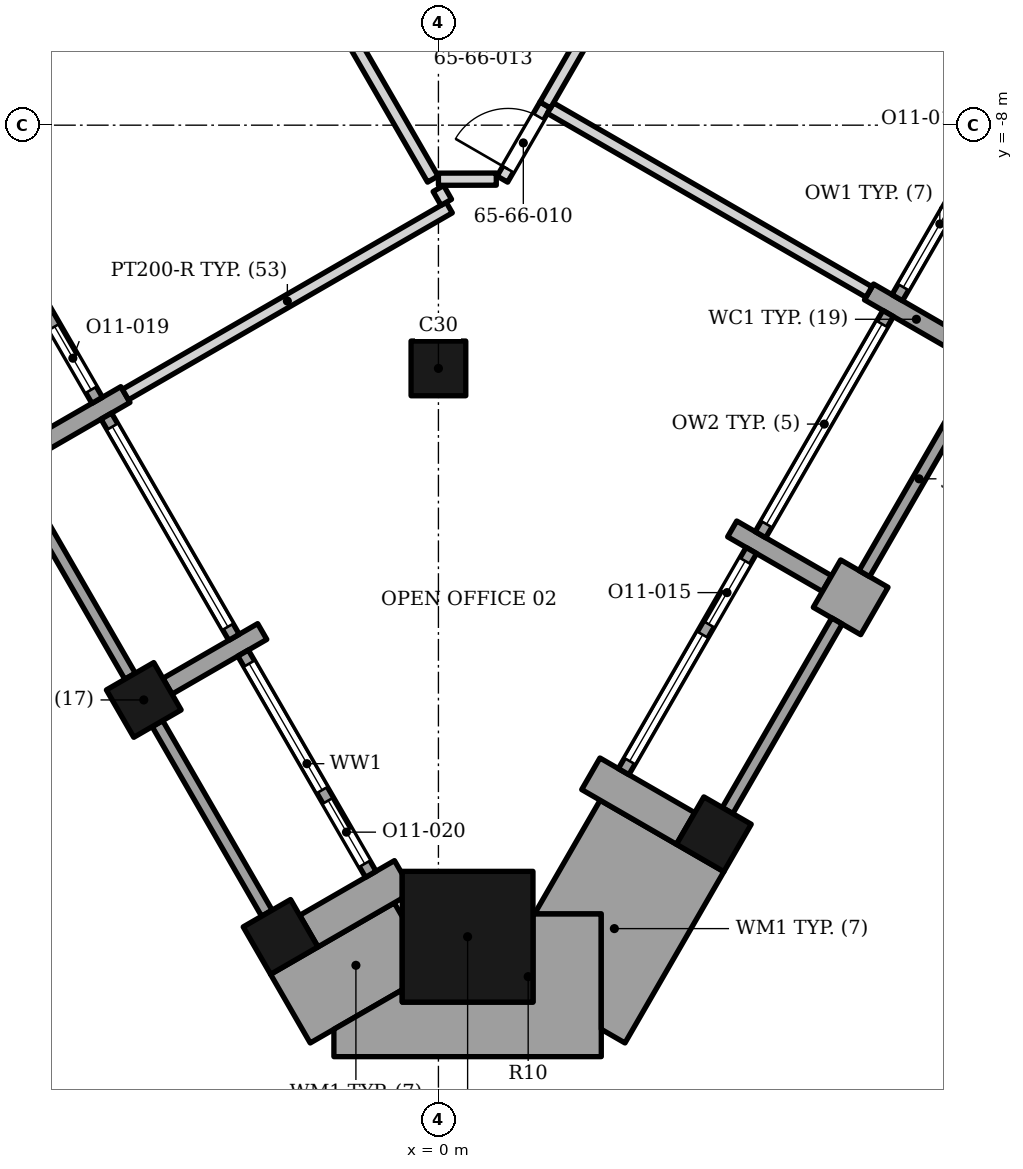
"""IFC4 building model, lengths in metres.
Left out: names, types, materials, properties, quantities, classifications, styles, units other than length and angle.
Written with IfcOpenShell. Run it as: python <this file> out.ifc"""

import sys

from ifc_helpers import new_model, si_unit, direction, frame, frame_2d, origin, origin_2d, place, context, subcontext, project, spatial, polyline, rectangle, outline, extrude, element, fill, save


model = new_model("IFC4")
c1 = context("Model", 3, precision=1e-05, world=origin(), true_north=direction((0.0, 1.0)))
c2 = subcontext(c1, "Body", "Model", "MODEL_VIEW")
j1 = project(units=[si_unit("LENGTHUNIT", "METRE"), si_unit("PLANEANGLEUNIT", "RADIAN")], contexts=[c1])
p1 = place(None, origin())
s1 = spatial("IfcSite", under=j1, at=p1, CompositionType="ELEMENT")
p2 = place(p1, origin())
s2 = spatial("IfcBuilding", under=s1, at=p2, CompositionType="ELEMENT")
p3 = place(p2, frame((0.0, 0.0, 271.6)))
s3 = spatial("IfcBuildingStorey", under=s2, at=p3, CompositionType="ELEMENT", Elevation=271.6)
p4 = place(p3, frame((0.48, -21.346, 0.0), z_axis=(0.0, 0.0, 1.0), x_axis=(0.0, 1.0, 0.0)))
e1 = element("IfcColumn", 1, at=p4, inside=s3, PredefinedType="COLUMN", context=c2, shape_type="SweptSolid", body=[
    extrude(rectangle(XDim=2.15, YDim=2.15, at=origin_2d()), origin(), (0.0, 0.0, 1.0), 3.9),
])
for number, where, z_axis, x_axis in (
    (2, (0.0, -12.0, 0.0), (0.0, 0.0, 1.0), (1.0, 0.0, 0.0)),
    (3, (-4.846, -17.452, 0.0), (0.0, 0.0, 1.0), (0.5, -0.866, 0.0)),
    (4, (-2.596, -21.349, 0.0), (0.0, 0.0, 1.0), (0.5, -0.866, 0.0)),
    (5, (4.53, -19.661, 0.0), (0.0, 0.0, 1.0), (0.5, 0.866, 0.0)),
):
    element("IfcColumn", number, at=place(p3, frame(where, z_axis=z_axis, x_axis=x_axis)), inside=s3, PredefinedType="COLUMN", context=c2, shape_type="SweptSolid", body=[
        extrude(rectangle(XDim=0.9, YDim=0.9, at=origin_2d()), origin(), (0.0, 0.0, 1.0), 3.9),
    ])
p5 = place(p3, frame((-6.707, -13.33, 0.0), z_axis=(0.0, 0.0, 1.0), x_axis=(0.866047807691, 0.499961193289, 0.0)))
e6 = element("IfcWall", 6, at=p5, inside=s3, PredefinedType="SOLIDWALL", context=c2, shape_type="SweptSolid", body=[
    extrude(rectangle(XDim=1.8, YDim=0.3, at=frame_2d((0.9, 0.0))), origin(), (0.0, 0.0, 1.0), 3.0),
])
p6 = place(p3, frame((-4.456, -17.227, 0.0), z_axis=(0.0, 0.0, 1.0), x_axis=(0.866013897511, 0.50001992892, 0.0)))
e7 = element("IfcWall", 7, at=p6, inside=s3, PredefinedType="SOLIDWALL", context=c2, shape_type="SweptSolid", body=[
    extrude(rectangle(XDim=1.8, YDim=0.3, at=frame_2d((0.9, 0.0))), origin(), (0.0, 0.0, 1.0), 3.0),
])
p7 = place(p3, origin())
e8 = element("IfcWall", 8, at=p7, inside=s3, PredefinedType="SOLIDWALL", context=c2, shape_type="SweptSolid", body=[
    extrude(outline(polyline([(-1.981, -21.514), (-0.595, -20.713), (-0.595, -20.315), (-0.723, -20.094), (-2.281, -20.994), (-1.981, -21.514)])), origin(), (0.0, 0.0, 1.0), 3.0),
])
p8 = place(p3, frame((-7.712, -8.888, 0.0), z_axis=(0.0, 0.0, 1.0), x_axis=(0.500027713859, -0.866009402589, 0.0)))
e9 = element("IfcWall", 9, at=p8, inside=s3, PredefinedType="ELEMENTEDWALL", context=c2, shape_type="SweptSolid", body=[
    extrude(rectangle(XDim=4.2, YDim=0.2, at=frame_2d((2.1, 0.0))), origin(), (0.0, 0.0, 1.0), 2.95),
])
p9 = place(p8, frame((0.2, 0.0, 0.45)))
e10 = element("IfcOpeningElement", 10, at=p9, cuts=e9, PredefinedType="OPENING", context=c2, shape_type="SweptSolid", body=[
    extrude(rectangle(XDim=2.4, YDim=2.25, at=frame_2d((1.2, 1.125))), frame((0.0, 0.11, 0.0), z_axis=(0.0, -1.0, 0.0), x_axis=(1.0, 0.0, 0.0)), (0.0, 0.0, 1.0), 0.22),
])
p10 = place(p8, frame((2.8, 0.0, 0.0)))
e11 = element("IfcOpeningElement", 11, at=p10, cuts=e9, PredefinedType="OPENING", context=c2, shape_type="SweptSolid", body=[
    extrude(rectangle(XDim=1.2, YDim=2.7, at=frame_2d((0.6, 1.35))), frame((0.0, 0.11, 0.0), z_axis=(0.0, -1.0, 0.0), x_axis=(1.0, 0.0, 0.0)), (0.0, 0.0, 1.0), 0.22),
])
p11 = place(p3, frame((-6.871, -13.945, 0.0), z_axis=(0.0, 0.0, 1.0), x_axis=(0.500012057535, -0.866018442252, 0.0)))
e12 = element("IfcWall", 12, at=p11, inside=s3, PredefinedType="SOLIDWALL", context=c2, shape_type="SweptSolid", body=[
    extrude(rectangle(XDim=3.6, YDim=0.2, at=frame_2d((1.8, 0.0))), origin(), (0.0, 0.0, 1.0), 3.0),
])
p12 = place(p3, frame((-5.462, -12.785, 0.0), z_axis=(0.0, 0.0, 1.0), x_axis=(0.500002543286, -0.866023935413, 0.0)))
e13 = element("IfcWall", 13, at=p12, inside=s3, PredefinedType="ELEMENTEDWALL", context=c2, shape_type="SweptSolid", body=[
    extrude(rectangle(XDim=4.2, YDim=0.2, at=frame_2d((2.1, 0.0))), origin(), (0.0, 0.0, 1.0), 3.0),
])
p13 = place(p12, frame((0.2, 0.0, 0.45)))
e14 = element("IfcOpeningElement", 14, at=p13, cuts=e13, PredefinedType="OPENING", context=c2, shape_type="SweptSolid", body=[
    extrude(rectangle(XDim=3.8, YDim=2.25, at=frame_2d((1.9, 1.125))), frame((0.0, 0.11, 0.0), z_axis=(0.0, -1.0, 0.0), x_axis=(1.0, 0.0, 0.0)), (0.0, 0.0, 1.0), 0.22),
])
p14 = place(p3, frame((-4.621, -17.842, 0.0), z_axis=(0.0, 0.0, 1.0), x_axis=(0.500012057535, -0.866018442252, 0.0)))
e15 = element("IfcWall", 15, at=p14, inside=s3, PredefinedType="SOLIDWALL", context=c2, shape_type="SweptSolid", body=[
    extrude(rectangle(XDim=3.6, YDim=0.2, at=frame_2d((1.8, 0.0))), origin(), (0.0, 0.0, 1.0), 3.0),
])
p15 = place(p3, frame((-3.212, -16.682, 0.0), z_axis=(0.0, 0.0, 1.0), x_axis=(0.500027713859, -0.866009402589, 0.0)))
e16 = element("IfcWall", 16, at=p15, inside=s3, PredefinedType="ELEMENTEDWALL", context=c2, shape_type="SweptSolid", body=[
    extrude(rectangle(XDim=4.2, YDim=0.2, at=frame_2d((2.1, 0.0))), origin(), (0.0, 0.0, 1.0), 3.0),
])
p16 = place(p15, frame((0.2, 0.0, 0.45)))
e17 = element("IfcOpeningElement", 17, at=p16, cuts=e16, PredefinedType="OPENING", context=c2, shape_type="SweptSolid", body=[
    extrude(rectangle(XDim=2.4, YDim=2.25, at=frame_2d((1.2, 1.125))), frame((0.0, 0.11, 0.0), z_axis=(0.0, -1.0, 0.0), x_axis=(1.0, 0.0, 0.0)), (0.0, 0.0, 1.0), 0.22),
])
p17 = place(p15, frame((2.8, 0.0, 0.0)))
e18 = element("IfcOpeningElement", 18, at=p17, cuts=e16, PredefinedType="OPENING", context=c2, shape_type="SweptSolid", body=[
    extrude(rectangle(XDim=1.2, YDim=2.7, at=frame_2d((0.6, 1.35))), frame((0.0, 0.11, 0.0), z_axis=(0.0, -1.0, 0.0), x_axis=(1.0, 0.0, 0.0)), (0.0, 0.0, 1.0), 0.22),
])
p18 = place(p3, frame((4.065, -19.566, 0.0), z_axis=(0.0, 0.0, 1.0), x_axis=(-0.865989075817, 0.500062916607, 0.0)))
e19 = element("IfcWall", 19, at=p18, inside=s3, PredefinedType="SOLIDWALL", context=c2, shape_type="SweptSolid", body=[
    extrude(rectangle(XDim=1.8, YDim=0.6, at=frame_2d((0.9, 0.0))), origin(), (0.0, 0.0, 1.0), 3.0),
])
p19 = place(p3, frame((7.005, -15.375, 0.0), z_axis=(0.0, 0.0, 1.0), x_axis=(-0.499902469156, -0.866081705922, 0.0)))
e20 = element("IfcWall", 20, at=p19, inside=s3, PredefinedType="SOLIDWALL", context=c2, shape_type="SweptSolid", body=[
    extrude(rectangle(XDim=0.9, YDim=0.9, at=frame_2d((0.45, 0.0))), origin(), (0.0, 0.0, 1.0), 3.0),
])
for number, where, z_axis, x_axis in (
    (21, (6.39, -15.539, 0.0), (0.0, 0.0, 1.0), (-0.866, 0.5, 0.0)),
    (22, (8.64, -11.642, 0.0), (0.0, 0.0, 1.0), (-0.866, 0.5, 0.0)),
):
    element("IfcWall", number, at=place(p3, frame(where, z_axis=z_axis, x_axis=x_axis)), inside=s3, PredefinedType="SOLIDWALL", context=c2, shape_type="SweptSolid", body=[
        extrude(rectangle(XDim=1.8, YDim=0.3, at=frame_2d((0.9, 0.0))), origin(), (0.0, 0.0, 1.0), 3.0),
    ])
p20 = place(p3, frame((4.755, -19.272, 0.0), z_axis=(0.0, 0.0, 1.0), x_axis=(0.500012057535, 0.866018442252, 0.0)))
e23 = element("IfcWall", 23, at=p20, inside=s3, PredefinedType="SOLIDWALL", context=c2, shape_type="SweptSolid", body=[
    extrude(rectangle(XDim=3.6, YDim=0.2, at=frame_2d((1.8, 0.0))), origin(), (0.0, 0.0, 1.0), 3.0),
])
p21 = place(p3, frame((3.046, -18.632, 0.0), z_axis=(0.0, 0.0, 1.0), x_axis=(0.499958946799, 0.866049104564, 0.0)))
e24 = element("IfcWall", 24, at=p21, inside=s3, PredefinedType="ELEMENTEDWALL", context=c2, shape_type="SweptSolid", body=[
    extrude(rectangle(XDim=4.2, YDim=0.2, at=frame_2d((2.1, 0.0))), origin(), (0.0, 0.0, 1.0), 3.0),
])
p22 = place(p21, frame((0.2, 0.0, 0.45)))
e25 = element("IfcOpeningElement", 25, at=p22, cuts=e24, PredefinedType="OPENING", context=c2, shape_type="SweptSolid", body=[
    extrude(rectangle(XDim=2.4, YDim=2.25, at=frame_2d((1.2, 1.125))), frame((0.0, 0.11, 0.0), z_axis=(0.0, -1.0, 0.0), x_axis=(1.0, 0.0, 0.0)), (0.0, 0.0, 1.0), 0.22),
])
p23 = place(p21, frame((2.8, 0.0, 0.0)))
e26 = element("IfcOpeningElement", 26, at=p23, cuts=e24, PredefinedType="OPENING", context=c2, shape_type="SweptSolid", body=[
    extrude(rectangle(XDim=1.2, YDim=2.7, at=frame_2d((0.6, 1.35))), frame((0.0, 0.11, 0.0), z_axis=(0.0, -1.0, 0.0), x_axis=(1.0, 0.0, 0.0)), (0.0, 0.0, 1.0), 0.22),
])
p24 = place(p3, frame((7.005, -15.375, 0.0), z_axis=(0.0, 0.0, 1.0), x_axis=(0.500012057535, 0.866018442252, 0.0)))
e27 = element("IfcWall", 27, at=p24, inside=s3, PredefinedType="SOLIDWALL", context=c2, shape_type="SweptSolid", body=[
    extrude(rectangle(XDim=3.6, YDim=0.2, at=frame_2d((1.8, 0.0))), origin(), (0.0, 0.0, 1.0), 3.0),
])
p25 = place(p3, frame((5.296, -14.734, 0.0), z_axis=(0.0, 0.0, 1.0), x_axis=(0.49998411664, 0.866034573852, 0.0)))
e28 = element("IfcWall", 28, at=p25, inside=s3, PredefinedType="ELEMENTEDWALL", context=c2, shape_type="SweptSolid", body=[
    extrude(rectangle(XDim=4.2, YDim=0.2, at=frame_2d((2.1, 0.0))), origin(), (0.0, 0.0, 1.0), 2.95),
])
p26 = place(p25, frame((0.2, 0.0, 0.45)))
e29 = element("IfcOpeningElement", 29, at=p26, cuts=e28, PredefinedType="OPENING", context=c2, shape_type="SweptSolid", body=[
    extrude(rectangle(XDim=3.8, YDim=2.25, at=frame_2d((1.9, 1.125))), frame((0.0, 0.11, 0.0), z_axis=(0.0, -1.0, 0.0), x_axis=(1.0, 0.0, 0.0)), (0.0, 0.0, 1.0), 0.22),
])
p27 = place(p3, frame((7.546, -10.837, 0.0), z_axis=(0.0, 0.0, 1.0), x_axis=(0.49998411664, 0.866034573852, 0.0)))
e30 = element("IfcWall", 30, at=p27, inside=s3, PredefinedType="ELEMENTEDWALL", context=c2, shape_type="SweptSolid", body=[
    extrude(rectangle(XDim=4.2, YDim=0.2, at=frame_2d((2.1, 0.0))), origin(), (0.0, 0.0, 1.0), 3.0),
])
p28 = place(p27, frame((0.2, 0.0, 0.45)))
e31 = element("IfcOpeningElement", 31, at=p28, cuts=e30, PredefinedType="OPENING", context=c2, shape_type="SweptSolid", body=[
    extrude(rectangle(XDim=2.4, YDim=2.25, at=frame_2d((1.2, 1.125))), frame((0.0, 0.11, 0.0), z_axis=(0.0, -1.0, 0.0), x_axis=(1.0, 0.0, 0.0)), (0.0, 0.0, 1.0), 0.22),
])
p29 = place(p27, frame((2.8, 0.0, 0.0)))
e32 = element("IfcOpeningElement", 32, at=p29, cuts=e30, PredefinedType="OPENING", context=c2, shape_type="SweptSolid", body=[
    extrude(rectangle(XDim=1.2, YDim=2.7, at=frame_2d((0.6, 1.35))), frame((0.0, 0.11, 0.0), z_axis=(0.0, -1.0, 0.0), x_axis=(1.0, 0.0, 0.0)), (0.0, 0.0, 1.0), 0.22),
])
p30 = place(p3, origin())
e33 = element("IfcWall", 33, at=p30, inside=s3, PredefinedType="SOLIDWALL", context=c2, shape_type="SweptSolid", body=[
    extrude(outline(polyline([(-0.595, -21.015), (-0.726, -20.789), (-2.761, -21.964), (-2.109, -23.093), (-0.595, -22.219), (-0.595, -21.015)])), origin(), (0.0, 0.0, 1.0), 3.0),
])
p31 = place(p3, origin())
e34 = element("IfcWall", 34, at=p31, inside=s3, PredefinedType="SOLIDWALL", context=c2, shape_type="SweptSolid", body=[
    extrude(outline(polyline([(-0.595, -22.421), (-0.595, -22.219), (-1.719, -22.868), (-1.719, -23.318), (2.678, -23.318), (2.678, -20.968), (1.555, -20.968), (1.555, -22.421), (-0.595, -22.421)])), origin(), (0.0, 0.0, 1.0), 3.0),
])
p32 = place(p3, origin())
e35 = element("IfcWall", 35, at=p32, inside=s3, PredefinedType="SOLIDWALL", context=c2, shape_type="SweptSolid", body=[
    extrude(outline(polyline([(2.678, -20.968), (2.678, -22.868), (3.068, -23.093), (4.695, -20.276), (2.659, -19.101), (1.582, -20.968), (2.678, -20.968)])), origin(), (0.0, 0.0, 1.0), 3.0),
])
p33 = place(p3, frame((-5.147, -12.43, 0.0), z_axis=(0.0, 0.0, 1.0), x_axis=(0.866013692856, 0.500020283374, 0.0)))
e36 = element("IfcWall", 36, at=p33, inside=s3, PredefinedType="PARTITIONING", context=c2, shape_type="SweptSolid", body=[
    extrude(rectangle(XDim=6.15, YDim=0.2, at=frame_2d((3.075, 0.0))), origin(), (0.0, 0.0, 1.0), 2.884),
])
p34 = place(p3, frame((0.0, -9.042, 0.0), z_axis=(0.0, 0.0, 1.0), x_axis=(0.494524249255, -0.869163832024, 0.0)))
e37 = element("IfcWall", 37, at=p34, inside=s3, PredefinedType="PARTITIONING", context=c2, shape_type="SweptSolid", body=[
    extrude(rectangle(XDim=0.261, YDim=0.2, at=frame_2d((0.13, 0.0))), origin(), (0.0, 0.0, 1.0), 2.884),
])
p35 = place(p3, frame((-4.323, -1.562, 0.0), z_axis=(0.0, 0.0, 1.0), x_axis=(0.500177101832, -0.865923129846, 0.0)))
e38 = element("IfcWall", 38, at=p35, inside=s3, PredefinedType="PARTITIONING", context=c2, shape_type="SweptSolid", body=[
    extrude(rectangle(XDim=8.459, YDim=0.2, at=frame_2d((4.23, 0.0))), origin(), (0.0, 0.0, 1.0), 2.884),
])
p36 = place(p35, frame((3.729, 0.0, 0.0)))
e39 = element("IfcOpeningElement", 39, at=p36, cuts=e38, PredefinedType="OPENING", context=c2, shape_type="SweptSolid", body=[
    extrude(rectangle(XDim=1.0, YDim=2.1, at=frame_2d((0.5, 1.05))), frame((0.0, 0.11, 0.0), z_axis=(0.0, -1.0, 0.0), x_axis=(1.0, 0.0, 0.0)), (0.0, 0.0, 1.0), 0.22),
])
p37 = place(p3, frame((0.0, -8.889, 0.0), z_axis=(0.0, 0.0, 1.0), x_axis=(0.999998814747, 0.001539644057, 0.0)))
e40 = element("IfcWall", 40, at=p37, inside=s3, PredefinedType="PARTITIONING", context=c2, shape_type="SweptSolid", body=[
    extrude(rectangle(XDim=0.951, YDim=0.2, at=frame_2d((0.476, 0.0))), origin(), (0.0, 0.0, 1.0), 3.73),
])
p38 = place(p3, frame((1.052, -8.887, 0.0), z_axis=(0.0, 0.0, 1.0), x_axis=(0.500967914192, 0.865465856606, 0.0)))
e41 = element("IfcWall", 41, at=p38, inside=s3, PredefinedType="PARTITIONING", context=c2, shape_type="SweptSolid", body=[
    extrude(rectangle(XDim=1.408, YDim=0.2, at=frame_2d((0.704, 0.0))), origin(), (0.0, 0.0, 1.0), 3.73),
])
p39 = place(p38, frame((0.188, 0.0, 0.0)))
e42 = element("IfcOpeningElement", 42, at=p39, cuts=e41, PredefinedType="OPENING", context=c2, shape_type="SweptSolid", body=[
    extrude(rectangle(XDim=1.0, YDim=2.1, at=frame_2d((0.5, 1.05))), frame((0.0, 0.11, 0.0), z_axis=(0.0, -1.0, 0.0), x_axis=(1.0, 0.0, 0.0)), (0.0, 0.0, 1.0), 0.22),
])
p40 = place(p3, frame((1.841, -7.719, 0.0), z_axis=(0.0, 0.0, 1.0), x_axis=(0.866131832054, -0.499815615506, 0.0)))
e43 = element("IfcWall", 43, at=p40, inside=s3, PredefinedType="PARTITIONING", context=c2, shape_type="SweptSolid", body=[
    extrude(rectangle(XDim=6.05, YDim=0.2, at=frame_2d((3.025, 0.0))), origin(), (0.0, 0.0, 1.0), 2.884),
])
p41 = place(p3, frame((1.757, -7.668, 0.0), z_axis=(0.0, 0.0, 1.0), x_axis=(0.500002084865, 0.866024200084, 0.0)))
e44 = element("IfcWall", 44, at=p41, inside=s3, PredefinedType="PARTITIONING", context=c2, shape_type="SweptSolid", body=[
    extrude(rectangle(XDim=12.949, YDim=0.2, at=frame_2d((6.474, 0.0))), origin(), (0.0, 0.0, 1.0), 2.884),
])
p42 = place(p41, frame((4.0, 0.0, 0.0)))
e45 = element("IfcOpeningElement", 45, at=p42, cuts=e44, PredefinedType="OPENING", context=c2, shape_type="SweptSolid", body=[
    extrude(rectangle(XDim=1.0, YDim=2.4, at=frame_2d((0.5, 1.2))), frame((0.0, 0.11, 0.0), z_axis=(0.0, -1.0, 0.0), x_axis=(1.0, 0.0, 0.0)), (0.0, 0.0, 1.0), 0.22),
])
p43 = place(p10, origin())
e46 = element("IfcDoor", 46, at=p43, inside=s3, OperationType="SINGLE_SWING_LEFT", PredefinedType="DOOR", context=c2, shape_type="SweptSolid", body=[
    extrude(rectangle(XDim=1.2, YDim=2.7, at=frame_2d((0.6, 1.35))), frame((0.0, 0.025, 0.0), z_axis=(0.0, -1.0, 0.0), x_axis=(1.0, 0.0, 0.0)), (0.0, 0.0, 1.0), 0.05),
])
fill(e11, e46)
p44 = place(p13, origin())
e47 = element("IfcWindow", 47, at=p44, inside=s3, PartitioningType="SINGLE_PANEL", PredefinedType="WINDOW", context=c2, shape_type="SweptSolid", body=[
    extrude(rectangle(XDim=3.8, YDim=2.25, at=frame_2d((1.9, 1.125))), frame((0.0, 0.03, 0.0), z_axis=(0.0, -1.0, 0.0), x_axis=(1.0, 0.0, 0.0)), (0.0, 0.0, 1.0), 0.06),
])
fill(e14, e47)
p45 = place(p16, origin())
e48 = element("IfcWindow", 48, at=p45, inside=s3, PartitioningType="SINGLE_PANEL", PredefinedType="WINDOW", context=c2, shape_type="SweptSolid", body=[
    extrude(rectangle(XDim=2.4, YDim=2.25, at=frame_2d((1.2, 1.125))), frame((0.0, 0.03, 0.0), z_axis=(0.0, -1.0, 0.0), x_axis=(1.0, 0.0, 0.0)), (0.0, 0.0, 1.0), 0.06),
])
fill(e17, e48)
p46 = place(p17, origin())
e49 = element("IfcDoor", 49, at=p46, inside=s3, OperationType="SINGLE_SWING_LEFT", PredefinedType="DOOR", context=c2, shape_type="SweptSolid", body=[
    extrude(rectangle(XDim=1.2, YDim=2.7, at=frame_2d((0.6, 1.35))), frame((0.0, 0.025, 0.0), z_axis=(0.0, -1.0, 0.0), x_axis=(1.0, 0.0, 0.0)), (0.0, 0.0, 1.0), 0.05),
])
fill(e18, e49)
p47 = place(p22, origin())
e50 = element("IfcWindow", 50, at=p47, inside=s3, PartitioningType="SINGLE_PANEL", PredefinedType="WINDOW", context=c2, shape_type="SweptSolid", body=[
    extrude(rectangle(XDim=2.4, YDim=2.25, at=frame_2d((1.2, 1.125))), frame((0.0, 0.03, 0.0), z_axis=(0.0, -1.0, 0.0), x_axis=(1.0, 0.0, 0.0)), (0.0, 0.0, 1.0), 0.06),
])
fill(e25, e50)
p48 = place(p23, origin())
e51 = element("IfcDoor", 51, at=p48, inside=s3, OperationType="SINGLE_SWING_LEFT", PredefinedType="DOOR", context=c2, shape_type="SweptSolid", body=[
    extrude(rectangle(XDim=1.2, YDim=2.7, at=frame_2d((0.6, 1.35))), frame((0.0, 0.025, 0.0), z_axis=(0.0, -1.0, 0.0), x_axis=(1.0, 0.0, 0.0)), (0.0, 0.0, 1.0), 0.05),
])
fill(e26, e51)
p49 = place(p26, origin())
e52 = element("IfcWindow", 52, at=p49, inside=s3, PartitioningType="SINGLE_PANEL", PredefinedType="WINDOW", context=c2, shape_type="SweptSolid", body=[
    extrude(rectangle(XDim=3.8, YDim=2.25, at=frame_2d((1.9, 1.125))), frame((0.0, 0.03, 0.0), z_axis=(0.0, -1.0, 0.0), x_axis=(1.0, 0.0, 0.0)), (0.0, 0.0, 1.0), 0.06),
])
fill(e29, e52)
p50 = place(p28, origin())
e53 = element("IfcWindow", 53, at=p50, inside=s3, PartitioningType="SINGLE_PANEL", PredefinedType="WINDOW", context=c2, shape_type="SweptSolid", body=[
    extrude(rectangle(XDim=2.4, YDim=2.25, at=frame_2d((1.2, 1.125))), frame((0.0, 0.03, 0.0), z_axis=(0.0, -1.0, 0.0), x_axis=(1.0, 0.0, 0.0)), (0.0, 0.0, 1.0), 0.06),
])
fill(e31, e53)
p51 = place(p39, origin())
e54 = element("IfcDoor", 54, at=p51, inside=s3, OperationType="SINGLE_SWING_LEFT", PredefinedType="DOOR", context=c2, shape_type="SweptSolid", body=[
    extrude(rectangle(XDim=1.0, YDim=2.1, at=frame_2d((0.5, 1.05))), frame((0.0, 0.025, 0.0), z_axis=(0.0, -1.0, 0.0), x_axis=(1.0, 0.0, 0.0)), (0.0, 0.0, 1.0), 0.05),
])
fill(e42, e54)
save(model, sys.argv[1])
